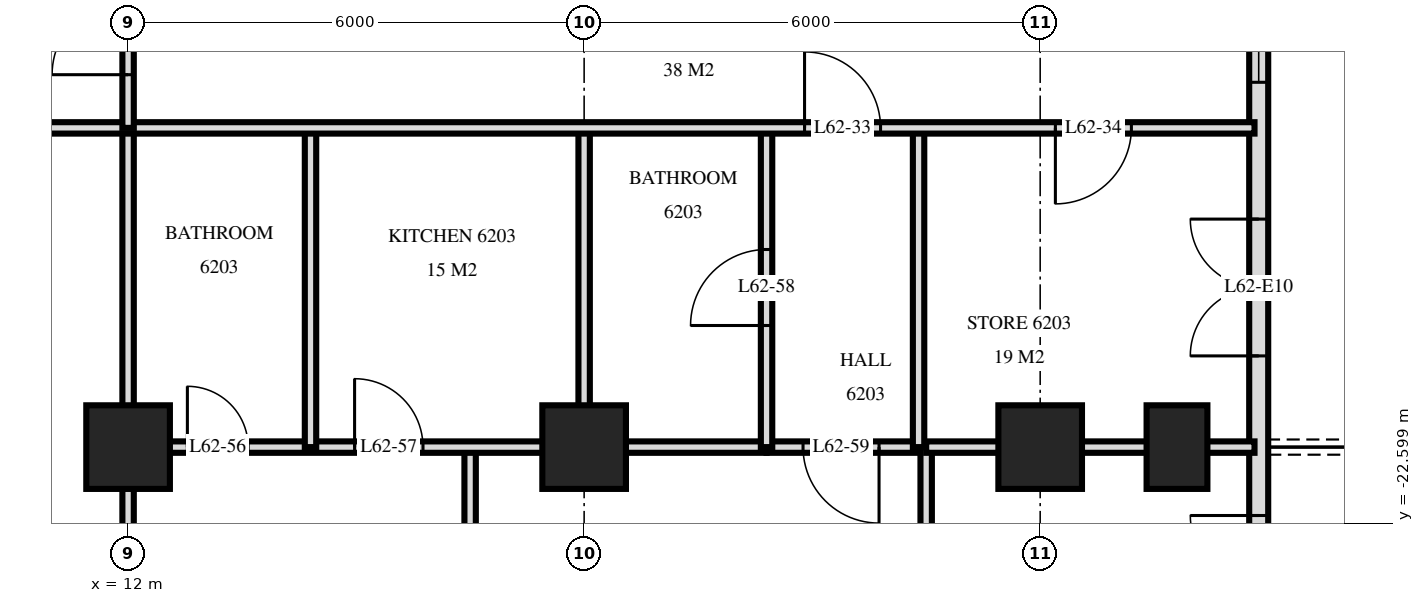
"""IFC4 building model, lengths in metres.
Left out: names, types, materials, properties, quantities, classifications, styles, units other than length and angle.
Written with IfcOpenShell. Run it as: python <this file> out.ifc"""

import sys

from ifc_helpers import new_model, si_unit, direction, frame, frame_2d, origin, origin_2d, place, context, subcontext, project, spatial, rectangle, extrude, element, fill, save


model = new_model("IFC4")
c1 = context("Model", 3, precision=1e-05, world=origin(), true_north=direction((0.0, 1.0)))
c2 = subcontext(c1, "Body", "Model", "MODEL_VIEW")
j1 = project(units=[si_unit("LENGTHUNIT", "METRE"), si_unit("PLANEANGLEUNIT", "RADIAN")], contexts=[c1])
p1 = place(None, origin())
s1 = spatial("IfcSite", under=j1, at=p1, CompositionType="ELEMENT")
p2 = place(p1, origin())
s2 = spatial("IfcBuilding", under=s1, at=p2, CompositionType="ELEMENT")
p3 = place(p2, frame((0.0, 0.0, 236.1)))
s3 = spatial("IfcBuildingStorey", under=s2, at=p3, CompositionType="ELEMENT", Elevation=236.1)
for number, where, z_axis, x_axis in (
    (1, (12.0, -21.6, 0.0), (0.0, 0.0, 1.0), (1.0, 0.0, 0.0)),
    (2, (18.0, -21.6, 0.0), (0.0, 0.0, 1.0), (1.0, 0.0, 0.0)),
    (3, (24.0, -21.6, 0.0), (0.0, 0.0, 1.0), (1.0, 0.0, 0.0)),
):
    element("IfcColumn", number, at=place(p3, frame(where, z_axis=z_axis, x_axis=x_axis)), inside=s3, PredefinedType="COLUMN", context=c2, shape_type="SweptSolid", body=[
        extrude(rectangle(XDim=1.1, YDim=1.1, at=origin_2d()), origin(), (0.0, 0.0, 1.0), 3.5),
    ])
p4 = place(p3, frame((25.8, -21.6, 0.0), z_axis=(0.0, 0.0, 1.0), x_axis=(0.0, 1.0, 0.0)))
e4 = element("IfcColumn", 4, at=p4, inside=s3, PredefinedType="COLUMN", context=c2, shape_type="SweptSolid", body=[
    extrude(rectangle(XDim=1.1, YDim=0.8, at=origin_2d()), origin(), (0.0, 0.0, 1.0), 3.5),
])
p5 = place(p3, frame((26.875, -24.875, 0.0), z_axis=(0.0, 0.0, 1.0), x_axis=(0.0, 1.0, 0.0)))
e5 = element("IfcWall", 5, at=p5, inside=s3, PredefinedType="SOLIDWALL", context=c2, shape_type="SweptSolid", body=[
    extrude(rectangle(XDim=21.551, YDim=0.25, at=frame_2d((10.775, 0.0))), origin(), (0.0, 0.0, 1.0), 3.22),
])
p6 = place(p5, frame((0.575, 0.0, 0.0)))
e6 = element("IfcOpeningElement", 6, at=p6, cuts=e5, PredefinedType="OPENING", context=c2, shape_type="SweptSolid", body=[
    extrude(rectangle(XDim=1.8, YDim=2.4, at=frame_2d((0.9, 1.2))), frame((0.0, 0.135, 0.0), z_axis=(0.0, -1.0, 0.0), x_axis=(1.0, 0.0, 0.0)), (0.0, 0.0, 1.0), 0.27),
])
p7 = place(p5, frame((4.475, 0.0, 0.0)))
e7 = element("IfcOpeningElement", 7, at=p7, cuts=e5, PredefinedType="OPENING", context=c2, shape_type="SweptSolid", body=[
    extrude(rectangle(XDim=1.8, YDim=2.4, at=frame_2d((0.9, 1.2))), frame((0.0, 0.135, 0.0), z_axis=(0.0, -1.0, 0.0), x_axis=(1.0, 0.0, 0.0)), (0.0, 0.0, 1.0), 0.27),
])
p8 = place(p5, frame((8.075, 0.0, 0.9)))
e8 = element("IfcOpeningElement", 8, at=p8, cuts=e5, PredefinedType="OPENING", context=c2, shape_type="SweptSolid", body=[
    extrude(rectangle(XDim=1.2, YDim=1.5, at=frame_2d((0.6, 0.75))), frame((0.0, 0.135, 0.0), z_axis=(0.0, -1.0, 0.0), x_axis=(1.0, 0.0, 0.0)), (0.0, 0.0, 1.0), 0.27),
])
p9 = place(p5, frame((12.225, 0.0, 0.0)))
e9 = element("IfcOpeningElement", 9, at=p9, cuts=e5, PredefinedType="OPENING", context=c2, shape_type="SweptSolid", body=[
    extrude(rectangle(XDim=1.8, YDim=2.4, at=frame_2d((0.9, 1.2))), frame((0.0, 0.135, 0.0), z_axis=(0.0, -1.0, 0.0), x_axis=(1.0, 0.0, 0.0)), (0.0, 0.0, 1.0), 0.27),
])
p10 = place(p3, frame((22.5, -29.217, 0.0), z_axis=(0.0, 0.0, 1.0), x_axis=(0.0, 1.0, 0.0)))
e10 = element("IfcWall", 10, at=p10, inside=s3, PredefinedType="PARTITIONING", context=c2, shape_type="SweptSolid", body=[
    extrude(rectangle(XDim=7.616, YDim=0.15, at=frame_2d((3.808, 0.0))), origin(), (0.0, 0.0, 1.0), 3.22),
])
p11 = place(p10, frame((3.247, 0.0, 0.0)))
e11 = element("IfcOpeningElement", 11, at=p11, cuts=e10, PredefinedType="OPENING", context=c2, shape_type="SweptSolid", body=[
    extrude(rectangle(XDim=0.9, YDim=2.1, at=frame_2d((0.45, 1.05))), frame((0.0, 0.085, 0.0), z_axis=(0.0, -1.0, 0.0), x_axis=(1.0, 0.0, 0.0)), (0.0, 0.0, 1.0), 0.17),
])
p12 = place(p3, frame((22.4, -21.6, 0.0), z_axis=(0.0, 0.0, 1.0), x_axis=(0.0, 1.0, 0.0)))
e12 = element("IfcWall", 12, at=p12, inside=s3, PredefinedType="PARTITIONING", context=c2, shape_type="SweptSolid", body=[
    extrude(rectangle(XDim=4.2, YDim=0.15, at=frame_2d((2.1, 0.0))), origin(), (0.0, 0.0, 1.0), 3.22),
])
p13 = place(p3, frame((20.4, -21.6, 0.0), z_axis=(0.0, 0.0, 1.0), x_axis=(0.0, 1.0, 0.0)))
e13 = element("IfcWall", 13, at=p13, inside=s3, PredefinedType="PARTITIONING", context=c2, shape_type="SweptSolid", body=[
    extrude(rectangle(XDim=4.2, YDim=0.15, at=frame_2d((2.1, 0.0))), origin(), (0.0, 0.0, 1.0), 3.22),
])
p14 = place(p13, frame((1.6, 0.0, 0.0)))
e14 = element("IfcOpeningElement", 14, at=p14, cuts=e13, PredefinedType="OPENING", context=c2, shape_type="SweptSolid", body=[
    extrude(rectangle(XDim=1.0, YDim=2.1, at=frame_2d((0.5, 1.05))), frame((0.0, 0.085, 0.0), z_axis=(0.0, -1.0, 0.0), x_axis=(1.0, 0.0, 0.0)), (0.0, 0.0, 1.0), 0.17),
])
p15 = place(p3, frame((18.0, -21.6, 0.0), z_axis=(0.0, 0.0, 1.0), x_axis=(0.0, 1.0, 0.0)))
e15 = element("IfcWall", 15, at=p15, inside=s3, PredefinedType="PARTITIONING", context=c2, shape_type="SweptSolid", body=[
    extrude(rectangle(XDim=4.2, YDim=0.15, at=frame_2d((2.1, 0.0))), origin(), (0.0, 0.0, 1.0), 3.22),
])
p16 = place(p3, frame((16.5, -29.22, 0.0), z_axis=(0.0, 0.0, 1.0), x_axis=(0.0, 1.0, 0.0)))
e16 = element("IfcWall", 16, at=p16, inside=s3, PredefinedType="PARTITIONING", context=c2, shape_type="SweptSolid", body=[
    extrude(rectangle(XDim=7.62, YDim=0.15, at=frame_2d((3.81, 0.0))), origin(), (0.0, 0.0, 1.0), 3.22),
])
p17 = place(p16, frame((3.29, 0.0, 0.0)))
e17 = element("IfcOpeningElement", 17, at=p17, cuts=e16, PredefinedType="OPENING", context=c2, shape_type="SweptSolid", body=[
    extrude(rectangle(XDim=0.9, YDim=2.1, at=frame_2d((0.45, 1.05))), frame((0.0, 0.085, 0.0), z_axis=(0.0, -1.0, 0.0), x_axis=(1.0, 0.0, 0.0)), (0.0, 0.0, 1.0), 0.17),
])
p18 = place(p3, frame((14.4, -21.6, 0.0), z_axis=(0.0, 0.0, 1.0), x_axis=(0.0, 1.0, 0.0)))
e18 = element("IfcWall", 18, at=p18, inside=s3, PredefinedType="PARTITIONING", context=c2, shape_type="SweptSolid", body=[
    extrude(rectangle(XDim=4.2, YDim=0.15, at=frame_2d((2.1, 0.0))), origin(), (0.0, 0.0, 1.0), 3.22),
])
p19 = place(p3, frame((12.0, -17.4, 0.0), z_axis=(0.0, 0.0, 1.0), x_axis=(0.0, 1.0, 0.0)))
e19 = element("IfcWall", 19, at=p19, inside=s3, PredefinedType="PARTITIONING", context=c2, shape_type="SweptSolid", body=[
    extrude(rectangle(XDim=2.35, YDim=0.15, at=frame_2d((1.175, 0.0))), origin(), (0.0, 0.0, 1.0), 3.22),
])
p20 = place(p19, frame((0.7, 0.0, 0.0)))
e20 = element("IfcOpeningElement", 20, at=p20, cuts=e19, PredefinedType="OPENING", context=c2, shape_type="SweptSolid", body=[
    extrude(rectangle(XDim=1.0, YDim=2.1, at=frame_2d((0.5, 1.05))), frame((0.0, 0.085, 0.0), z_axis=(0.0, -1.0, 0.0), x_axis=(1.0, 0.0, 0.0)), (0.0, 0.0, 1.0), 0.17),
])
p21 = place(p3, frame((12.0, -29.22, 0.0), z_axis=(0.0, 0.0, 1.0), x_axis=(0.0, 1.0, 0.0)))
e21 = element("IfcWall", 21, at=p21, inside=s3, PredefinedType="PARTITIONING", context=c2, shape_type="SweptSolid", body=[
    extrude(rectangle(XDim=11.82, YDim=0.15, at=frame_2d((5.91, 0.0))), origin(), (0.0, 0.0, 1.0), 3.22),
])
p22 = place(p3, frame((20.4, -21.6, 0.0), z_axis=(0.0, 0.0, 1.0), x_axis=(1.0, 0.0, 0.0)))
e22 = element("IfcWall", 22, at=p22, inside=s3, PredefinedType="PARTITIONING", context=c2, shape_type="SweptSolid", body=[
    extrude(rectangle(XDim=2.0, YDim=0.15, at=frame_2d((1.0, 0.0))), origin(), (0.0, 0.0, 1.0), 3.22),
])
p23 = place(p22, frame((0.48, 0.0, 0.0)))
e23 = element("IfcOpeningElement", 23, at=p23, cuts=e22, PredefinedType="OPENING", context=c2, shape_type="SweptSolid", body=[
    extrude(rectangle(XDim=1.0, YDim=2.1, at=frame_2d((0.5, 1.05))), frame((0.0, 0.085, 0.0), z_axis=(0.0, -1.0, 0.0), x_axis=(1.0, 0.0, 0.0)), (0.0, 0.0, 1.0), 0.17),
])
p24 = place(p3, frame((12.0, -21.6, 0.0), z_axis=(0.0, 0.0, 1.0), x_axis=(1.0, 0.0, 0.0)))
e24 = element("IfcWall", 24, at=p24, inside=s3, PredefinedType="PARTITIONING", context=c2, shape_type="SweptSolid", body=[
    extrude(rectangle(XDim=8.4, YDim=0.15, at=frame_2d((4.2, 0.0))), origin(), (0.0, 0.0, 1.0), 3.22),
])
p25 = place(p24, frame((0.78, 0.0, 0.0)))
e25 = element("IfcOpeningElement", 25, at=p25, cuts=e24, PredefinedType="OPENING", context=c2, shape_type="SweptSolid", body=[
    extrude(rectangle(XDim=0.8, YDim=2.1, at=frame_2d((0.4, 1.05))), frame((0.0, 0.085, 0.0), z_axis=(0.0, -1.0, 0.0), x_axis=(1.0, 0.0, 0.0)), (0.0, 0.0, 1.0), 0.17),
])
p26 = place(p24, frame((2.98, 0.0, 0.0)))
e26 = element("IfcOpeningElement", 26, at=p26, cuts=e24, PredefinedType="OPENING", context=c2, shape_type="SweptSolid", body=[
    extrude(rectangle(XDim=0.9, YDim=2.1, at=frame_2d((0.45, 1.05))), frame((0.0, 0.085, 0.0), z_axis=(0.0, -1.0, 0.0), x_axis=(1.0, 0.0, 0.0)), (0.0, 0.0, 1.0), 0.17),
])
p27 = place(p3, frame((22.5, -21.6, 0.0), z_axis=(0.0, 0.0, 1.0), x_axis=(1.0, 0.0, 0.0)))
e27 = element("IfcWall", 27, at=p27, inside=s3, PredefinedType="PARTITIONING", context=c2, shape_type="SweptSolid", body=[
    extrude(rectangle(XDim=4.32, YDim=0.15, at=frame_2d((2.16, 0.0))), origin(), (0.0, 0.0, 1.0), 3.22),
])
p28 = place(p3, frame((-26.82, -17.4, 0.0), z_axis=(0.0, 0.0, 1.0), x_axis=(1.0, 0.0, 0.0)))
e28 = element("IfcWall", 28, at=p28, inside=s3, PredefinedType="PARTITIONING", context=c2, shape_type="SweptSolid", body=[
    extrude(rectangle(XDim=53.64, YDim=0.15, at=frame_2d((26.82, 0.0))), origin(), (0.0, 0.0, 1.0), 3.22),
])
p29 = place(p28, frame((11.97, 0.0, 0.0)))
e29 = element("IfcOpeningElement", 29, at=p29, cuts=e28, PredefinedType="OPENING", context=c2, shape_type="SweptSolid", body=[
    extrude(rectangle(XDim=1.0, YDim=2.1, at=frame_2d((0.5, 1.05))), frame((0.0, 0.085, 0.0), z_axis=(0.0, -1.0, 0.0), x_axis=(1.0, 0.0, 0.0)), (0.0, 0.0, 1.0), 0.17),
])
p30 = place(p28, frame((3.92, 0.0, 0.0)))
e30 = element("IfcOpeningElement", 30, at=p30, cuts=e28, PredefinedType="OPENING", context=c2, shape_type="SweptSolid", body=[
    extrude(rectangle(XDim=1.0, YDim=2.1, at=frame_2d((0.5, 1.05))), frame((0.0, 0.085, 0.0), z_axis=(0.0, -1.0, 0.0), x_axis=(1.0, 0.0, 0.0)), (0.0, 0.0, 1.0), 0.17),
])
p31 = place(p28, frame((5.72, 0.0, 0.0)))
e31 = element("IfcOpeningElement", 31, at=p31, cuts=e28, PredefinedType="OPENING", context=c2, shape_type="SweptSolid", body=[
    extrude(rectangle(XDim=1.0, YDim=2.1, at=frame_2d((0.5, 1.05))), frame((0.0, 0.085, 0.0), z_axis=(0.0, -1.0, 0.0), x_axis=(1.0, 0.0, 0.0)), (0.0, 0.0, 1.0), 0.17),
])
p32 = place(p28, frame((47.72, 0.0, 0.0)))
e32 = element("IfcOpeningElement", 32, at=p32, cuts=e28, PredefinedType="OPENING", context=c2, shape_type="SweptSolid", body=[
    extrude(rectangle(XDim=1.0, YDim=2.1, at=frame_2d((0.5, 1.05))), frame((0.0, 0.085, 0.0), z_axis=(0.0, -1.0, 0.0), x_axis=(1.0, 0.0, 0.0)), (0.0, 0.0, 1.0), 0.17),
])
p33 = place(p28, frame((51.02, 0.0, 0.0)))
e33 = element("IfcOpeningElement", 33, at=p33, cuts=e28, PredefinedType="OPENING", context=c2, shape_type="SweptSolid", body=[
    extrude(rectangle(XDim=1.0, YDim=2.1, at=frame_2d((0.5, 1.05))), frame((0.0, 0.085, 0.0), z_axis=(0.0, -1.0, 0.0), x_axis=(1.0, 0.0, 0.0)), (0.0, 0.0, 1.0), 0.17),
])
p34 = place(p28, frame((17.32, 0.0, 0.0)))
e34 = element("IfcOpeningElement", 34, at=p34, cuts=e28, PredefinedType="OPENING", context=c2, shape_type="SweptSolid", body=[
    extrude(rectangle(XDim=1.0, YDim=2.1, at=frame_2d((0.5, 1.05))), frame((0.0, 0.085, 0.0), z_axis=(0.0, -1.0, 0.0), x_axis=(1.0, 0.0, 0.0)), (0.0, 0.0, 1.0), 0.17),
])
p35 = place(p28, frame((23.32, 0.0, 0.0)))
e35 = element("IfcOpeningElement", 35, at=p35, cuts=e28, PredefinedType="OPENING", context=c2, shape_type="SweptSolid", body=[
    extrude(rectangle(XDim=1.0, YDim=2.1, at=frame_2d((0.5, 1.05))), frame((0.0, 0.085, 0.0), z_axis=(0.0, -1.0, 0.0), x_axis=(1.0, 0.0, 0.0)), (0.0, 0.0, 1.0), 0.17),
])
p36 = place(p28, frame((29.32, 0.0, 0.0)))
e36 = element("IfcOpeningElement", 36, at=p36, cuts=e28, PredefinedType="OPENING", context=c2, shape_type="SweptSolid", body=[
    extrude(rectangle(XDim=1.0, YDim=2.1, at=frame_2d((0.5, 1.05))), frame((0.0, 0.085, 0.0), z_axis=(0.0, -1.0, 0.0), x_axis=(1.0, 0.0, 0.0)), (0.0, 0.0, 1.0), 0.17),
])
p37 = place(p28, frame((35.32, 0.0, 0.0)))
e37 = element("IfcOpeningElement", 37, at=p37, cuts=e28, PredefinedType="OPENING", context=c2, shape_type="SweptSolid", body=[
    extrude(rectangle(XDim=1.0, YDim=2.1, at=frame_2d((0.5, 1.05))), frame((0.0, 0.085, 0.0), z_axis=(0.0, -1.0, 0.0), x_axis=(1.0, 0.0, 0.0)), (0.0, 0.0, 1.0), 0.17),
])
p38 = place(p6, origin())
e38 = element("IfcDoor", 38, at=p38, inside=s3, OperationType="DOUBLE_DOOR_SINGLE_SWING", PredefinedType="DOOR", context=c2, shape_type="SweptSolid", body=[
    extrude(rectangle(XDim=1.8, YDim=2.4, at=frame_2d((0.9, 1.2))), frame((0.0, 0.025, 0.0), z_axis=(0.0, -1.0, 0.0), x_axis=(1.0, 0.0, 0.0)), (0.0, 0.0, 1.0), 0.05),
])
fill(e6, e38)
p39 = place(p7, origin())
e39 = element("IfcDoor", 39, at=p39, inside=s3, OperationType="DOUBLE_DOOR_SINGLE_SWING", PredefinedType="DOOR", context=c2, shape_type="SweptSolid", body=[
    extrude(rectangle(XDim=1.8, YDim=2.4, at=frame_2d((0.9, 1.2))), frame((0.0, 0.025, 0.0), z_axis=(0.0, -1.0, 0.0), x_axis=(1.0, 0.0, 0.0)), (0.0, 0.0, 1.0), 0.05),
])
fill(e7, e39)
p40 = place(p8, origin())
e40 = element("IfcWindow", 40, at=p40, inside=s3, PartitioningType="SINGLE_PANEL", PredefinedType="WINDOW", context=c2, shape_type="SweptSolid", body=[
    extrude(rectangle(XDim=1.2, YDim=1.5, at=frame_2d((0.6, 0.75))), frame((0.0, 0.03, 0.0), z_axis=(0.0, -1.0, 0.0), x_axis=(1.0, 0.0, 0.0)), (0.0, 0.0, 1.0), 0.06),
])
fill(e8, e40)
p41 = place(p20, origin())
e41 = element("IfcDoor", 41, at=p41, inside=s3, OperationType="SINGLE_SWING_RIGHT", PredefinedType="DOOR", context=c2, shape_type="SweptSolid", body=[
    extrude(rectangle(XDim=1.0, YDim=2.1, at=frame_2d((0.5, 1.05))), frame((0.0, 0.025, 0.0), z_axis=(0.0, -1.0, 0.0), x_axis=(1.0, 0.0, 0.0)), (0.0, 0.0, 1.0), 0.05),
])
fill(e20, e41)
p42 = place(p32, origin())
e42 = element("IfcDoor", 42, at=p42, inside=s3, OperationType="SINGLE_SWING_RIGHT", PredefinedType="DOOR", context=c2, shape_type="SweptSolid", body=[
    extrude(rectangle(XDim=1.0, YDim=2.1, at=frame_2d((0.5, 1.05))), frame((0.0, 0.025, 0.0), z_axis=(0.0, -1.0, 0.0), x_axis=(1.0, 0.0, 0.0)), (0.0, 0.0, 1.0), 0.05),
])
fill(e32, e42)
p43 = place(p33, frame((0.5, 0.0, 0.0), z_axis=(0.0, 0.0, 1.0), x_axis=(-1.0, 0.0, 0.0)))
e43 = element("IfcDoor", 43, at=p43, inside=s3, OperationType="SINGLE_SWING_LEFT", PredefinedType="DOOR", context=c2, shape_type="SweptSolid", body=[
    extrude(rectangle(XDim=1.0, YDim=2.1, at=frame_2d((0.0, 1.05))), frame((0.0, -0.025, 0.0), z_axis=(0.0, 1.0, 0.0), x_axis=(-1.0, 0.0, 0.0)), (0.0, 0.0, 1.0), 0.05),
])
fill(e33, e43)
p44 = place(p25, origin())
e44 = element("IfcDoor", 44, at=p44, inside=s3, OperationType="SINGLE_SWING_RIGHT", PredefinedType="DOOR", context=c2, shape_type="SweptSolid", body=[
    extrude(rectangle(XDim=0.8, YDim=2.1, at=frame_2d((0.4, 1.05))), frame((0.0, 0.025, 0.0), z_axis=(0.0, -1.0, 0.0), x_axis=(1.0, 0.0, 0.0)), (0.0, 0.0, 1.0), 0.05),
])
fill(e25, e44)
p45 = place(p26, origin())
e45 = element("IfcDoor", 45, at=p45, inside=s3, OperationType="SINGLE_SWING_RIGHT", PredefinedType="DOOR", context=c2, shape_type="SweptSolid", body=[
    extrude(rectangle(XDim=0.9, YDim=2.1, at=frame_2d((0.45, 1.05))), frame((0.0, 0.025, 0.0), z_axis=(0.0, -1.0, 0.0), x_axis=(1.0, 0.0, 0.0)), (0.0, 0.0, 1.0), 0.05),
])
fill(e26, e45)
p46 = place(p14, origin())
e46 = element("IfcDoor", 46, at=p46, inside=s3, OperationType="SINGLE_SWING_RIGHT", PredefinedType="DOOR", context=c2, shape_type="SweptSolid", body=[
    extrude(rectangle(XDim=1.0, YDim=2.1, at=frame_2d((0.5, 1.05))), frame((0.0, 0.025, 0.0), z_axis=(0.0, -1.0, 0.0), x_axis=(1.0, 0.0, 0.0)), (0.0, 0.0, 1.0), 0.05),
])
fill(e14, e46)
p47 = place(p23, frame((0.5, 0.0, 0.0), z_axis=(0.0, 0.0, 1.0), x_axis=(-1.0, 0.0, 0.0)))
e47 = element("IfcDoor", 47, at=p47, inside=s3, OperationType="SINGLE_SWING_RIGHT", PredefinedType="DOOR", context=c2, shape_type="SweptSolid", body=[
    extrude(rectangle(XDim=1.0, YDim=2.1, at=frame_2d((0.0, 1.05))), frame((0.0, -0.025, 0.0), z_axis=(0.0, 1.0, 0.0), x_axis=(-1.0, 0.0, 0.0)), (0.0, 0.0, 1.0), 0.05),
])
fill(e23, e47)
save(model, sys.argv[1])
